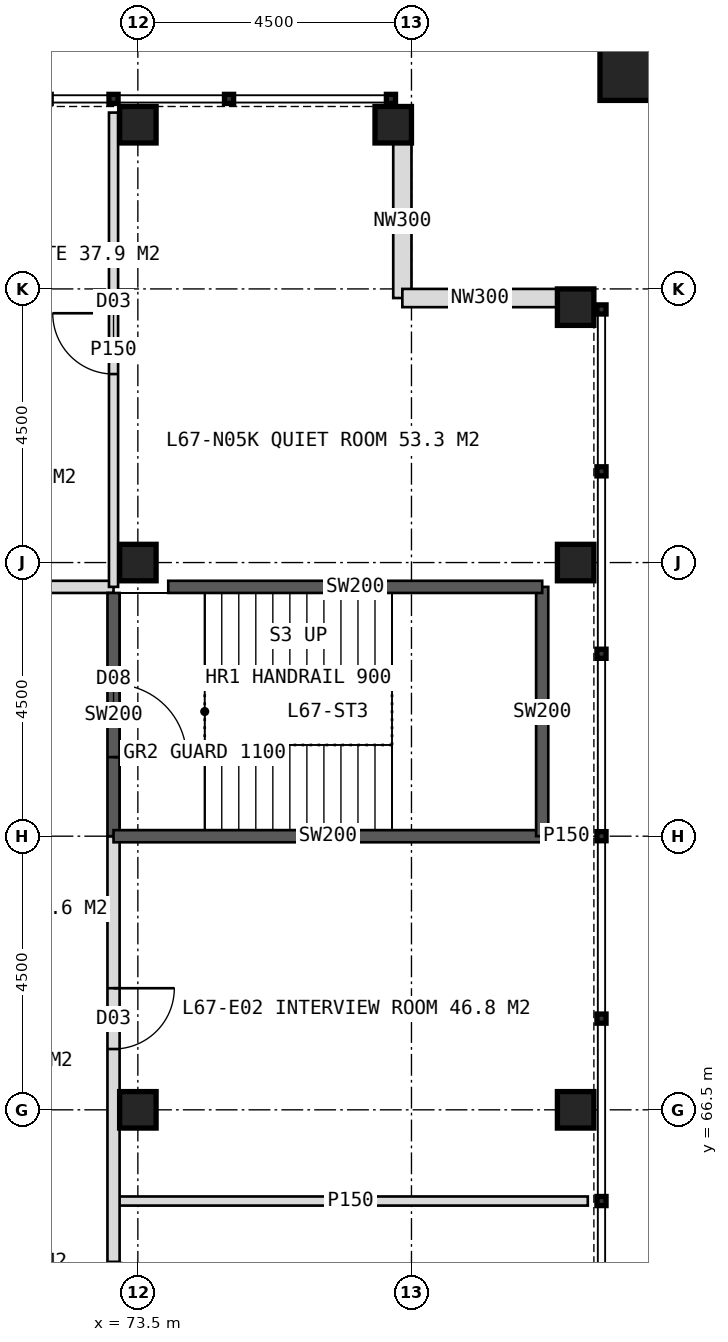
"""IFC4 building model, lengths in metres.
Left out: names, types, materials, properties, quantities, classifications, styles, units other than length and angle.
Written with IfcOpenShell. Run it as: python <this file> out.ifc"""

import sys

from ifc_helpers import new_model, si_unit, direction, frame, frame_2d, origin, origin_2d, place, context, subcontext, project, spatial, rectangle, hollow_rectangle, extrude, element, fill, save


model = new_model("IFC4")
c1 = context("Model", 3, precision=1e-05, world=origin(), true_north=direction((0.0, 1.0)))
c2 = subcontext(c1, "Body", "Model", "MODEL_VIEW")
j1 = project(units=[si_unit("LENGTHUNIT", "METRE"), si_unit("PLANEANGLEUNIT", "RADIAN")], contexts=[c1])
p1 = place(None, origin())
s1 = spatial("IfcSite", under=j1, at=p1, CompositionType="ELEMENT")
p2 = place(p1, origin())
s2 = spatial("IfcBuilding", under=s1, at=p2, CompositionType="ELEMENT")
p3 = place(p2, frame((0.0, 0.0, 278.0)))
s3 = spatial("IfcBuildingStorey", under=s2, at=p3, CompositionType="ELEMENT", Elevation=278.0)
for number, where, z_axis, x_axis in (
    (1, (73.5, 75.5, 0.0), (0.0, 0.0, 1.0), (1.0, 0.0, 0.0)),
    (2, (73.5, 66.5, 0.0), (0.0, 0.0, 1.0), (1.0, 0.0, 0.0)),
    (3, (80.7, 66.5, 0.0), (0.0, 0.0, 1.0), (1.0, 0.0, 0.0)),
    (4, (73.5, 82.7, 0.0), (0.0, 0.0, 1.0), (1.0, 0.0, 0.0)),
    (5, (80.7, 75.5, 0.0), (0.0, 0.0, 1.0), (1.0, 0.0, 0.0)),
    (6, (77.7, 82.7, 0.0), (0.0, 0.0, 1.0), (1.0, 0.0, 0.0)),
    (7, (80.7, 79.7, 0.0), (0.0, 0.0, 1.0), (1.0, 0.0, 0.0)),
):
    element("IfcColumn", number, at=place(p3, frame(where, z_axis=z_axis, x_axis=x_axis)), inside=s3, PredefinedType="COLUMN", context=c2, shape_type="SweptSolid", body=[
        extrude(hollow_rectangle(XDim=0.6, YDim=0.6, WallThickness=0.04, at=origin_2d()), origin(), (0.0, 0.0, 1.0), 4.0),
    ])
p4 = place(p3, frame((81.6, 83.6, 0.0), z_axis=(0.0, 0.0, 1.0), x_axis=(1.0, 0.0, 0.0)))
e8 = element("IfcColumn", 8, at=p4, inside=s3, PredefinedType="COLUMN", context=c2, shape_type="SweptSolid", body=[
    extrude(hollow_rectangle(XDim=1.0, YDim=1.0, WallThickness=0.06, at=origin_2d()), origin(), (0.0, 0.0, 1.0), 4.0),
])
for number, where, z_axis, x_axis in (
    (9, (77.85, 82.4, 0.0), (0.0, 0.0, 1.0), (0.0, -1.0, 0.0)),
    (10, (77.85, 79.85, 0.0), (0.0, 0.0, 1.0), (1.0, 0.0, 0.0)),
):
    element("IfcWall", number, at=place(p3, frame(where, z_axis=z_axis, x_axis=x_axis)), inside=s3, PredefinedType="ELEMENTEDWALL", context=c2, shape_type="SweptSolid", body=[
        extrude(rectangle(XDim=2.55, YDim=0.3, at=frame_2d((1.275, 0.0))), origin(), (0.0, 0.0, 1.0), 2.95),
    ])
p5 = place(p3, frame((46.9, 75.1, 0.0), z_axis=(0.0, 0.0, 1.0), x_axis=(1.0, 0.0, 0.0)))
e11 = element("IfcWall", 11, at=p5, inside=s3, PredefinedType="PARTITIONING", context=c2, shape_type="SweptSolid", body=[
    extrude(rectangle(XDim=26.2, YDim=0.2, at=frame_2d((13.1, 0.0))), origin(), (0.0, 0.0, 1.0), 3.75),
])
p6 = place(p5, frame((1.75, 0.0, 0.0)))
e12 = element("IfcOpeningElement", 12, at=p6, cuts=e11, PredefinedType="OPENING", context=c2, shape_type="SweptSolid", body=[
    extrude(rectangle(XDim=1.2, YDim=2.2, at=frame_2d((0.6, 1.1))), frame((0.0, 0.11, 0.0), z_axis=(0.0, -1.0, 0.0), x_axis=(1.0, 0.0, 0.0)), (0.0, 0.0, 1.0), 0.22),
])
p7 = place(p5, frame((6.75, 0.0, 0.0)))
e13 = element("IfcOpeningElement", 13, at=p7, cuts=e11, PredefinedType="OPENING", context=c2, shape_type="SweptSolid", body=[
    extrude(rectangle(XDim=1.0, YDim=2.1, at=frame_2d((0.5, 1.05))), frame((0.0, 0.11, 0.0), z_axis=(0.0, -1.0, 0.0), x_axis=(1.0, 0.0, 0.0)), (0.0, 0.0, 1.0), 0.22),
])
p8 = place(p5, frame((12.75, 0.0, 0.0)))
e14 = element("IfcOpeningElement", 14, at=p8, cuts=e11, PredefinedType="OPENING", context=c2, shape_type="SweptSolid", body=[
    extrude(rectangle(XDim=1.2, YDim=2.2, at=frame_2d((0.6, 1.1))), frame((0.0, 0.11, 0.0), z_axis=(0.0, -1.0, 0.0), x_axis=(1.0, 0.0, 0.0)), (0.0, 0.0, 1.0), 0.22),
])
p9 = place(p5, frame((18.45, 0.0, 0.0)))
e15 = element("IfcOpeningElement", 15, at=p9, cuts=e11, PredefinedType="OPENING", context=c2, shape_type="SweptSolid", body=[
    extrude(rectangle(XDim=1.0, YDim=2.1, at=frame_2d((0.5, 1.05))), frame((0.0, 0.11, 0.0), z_axis=(0.0, -1.0, 0.0), x_axis=(1.0, 0.0, 0.0)), (0.0, 0.0, 1.0), 0.22),
])
p10 = place(p5, frame((23.25, 0.0, 0.0)))
e16 = element("IfcOpeningElement", 16, at=p10, cuts=e11, PredefinedType="OPENING", context=c2, shape_type="SweptSolid", body=[
    extrude(rectangle(XDim=1.2, YDim=2.2, at=frame_2d((0.6, 1.1))), frame((0.0, 0.11, 0.0), z_axis=(0.0, -1.0, 0.0), x_axis=(1.0, 0.0, 0.0)), (0.0, 0.0, 1.0), 0.22),
])
p11 = place(p3, frame((73.1, 75.1, 0.0), z_axis=(0.0, 0.0, 1.0), x_axis=(0.0, 1.0, 0.0)))
e17 = element("IfcWall", 17, at=p11, inside=s3, PredefinedType="PARTITIONING", context=c2, shape_type="SweptSolid", body=[
    extrude(rectangle(XDim=7.8, YDim=0.15, at=frame_2d((3.9, 0.0))), origin(), (0.0, 0.0, 1.0), 3.75),
])
p12 = place(p11, frame((3.5, 0.0, 0.0)))
e18 = element("IfcOpeningElement", 18, at=p12, cuts=e17, PredefinedType="OPENING", context=c2, shape_type="SweptSolid", body=[
    extrude(rectangle(XDim=1.0, YDim=2.1, at=frame_2d((0.5, 1.05))), frame((0.0, 0.085, 0.0), z_axis=(0.0, -1.0, 0.0), x_axis=(1.0, 0.0, 0.0)), (0.0, 0.0, 1.0), 0.17),
])
p13 = place(p3, frame((80.2, 71.0, 0.0), z_axis=(0.0, 0.0, 1.0), x_axis=(1.0, 0.0, 0.0)))
e19 = element("IfcWall", 19, at=p13, inside=s3, PredefinedType="PARTITIONING", context=c2, shape_type="SweptSolid", body=[
    extrude(rectangle(XDim=0.7, YDim=0.15, at=frame_2d((0.35, 0.0))), origin(), (0.0, 0.0, 1.0), 3.75),
])
p14 = place(p3, frame((73.1, 65.0, 0.0), z_axis=(0.0, 0.0, 1.0), x_axis=(1.0, 0.0, 0.0)))
e20 = element("IfcWall", 20, at=p14, inside=s3, PredefinedType="PARTITIONING", context=c2, shape_type="SweptSolid", body=[
    extrude(rectangle(XDim=7.8, YDim=0.15, at=frame_2d((3.9, 0.0))), origin(), (0.0, 0.0, 1.0), 3.75),
])
p15 = place(p3, frame((73.1, 71.0, 0.0), z_axis=(0.0, 0.0, 1.0), x_axis=(0.0, -1.0, 0.0)))
e21 = element("IfcWall", 21, at=p15, inside=s3, PredefinedType="PARTITIONING", context=c2, shape_type="SweptSolid", body=[
    extrude(rectangle(XDim=22.1, YDim=0.2, at=frame_2d((11.05, 0.0))), origin(), (0.0, 0.0, 1.0), 3.75),
])
p16 = place(p15, frame((2.5, 0.0, 0.0)))
e22 = element("IfcOpeningElement", 22, at=p16, cuts=e21, PredefinedType="OPENING", context=c2, shape_type="SweptSolid", body=[
    extrude(rectangle(XDim=1.0, YDim=2.1, at=frame_2d((0.5, 1.05))), frame((0.0, 0.11, 0.0), z_axis=(0.0, -1.0, 0.0), x_axis=(1.0, 0.0, 0.0)), (0.0, 0.0, 1.0), 0.22),
])
p17 = place(p15, frame((7.0, 0.0, 0.0)))
e23 = element("IfcOpeningElement", 23, at=p17, cuts=e21, PredefinedType="OPENING", context=c2, shape_type="SweptSolid", body=[
    extrude(rectangle(XDim=1.0, YDim=2.1, at=frame_2d((0.5, 1.05))), frame((0.0, 0.11, 0.0), z_axis=(0.0, -1.0, 0.0), x_axis=(1.0, 0.0, 0.0)), (0.0, 0.0, 1.0), 0.22),
])
p18 = place(p15, frame((9.75, 0.0, 0.0)))
e24 = element("IfcOpeningElement", 24, at=p18, cuts=e21, PredefinedType="OPENING", context=c2, shape_type="SweptSolid", body=[
    extrude(rectangle(XDim=0.9, YDim=2.1, at=frame_2d((0.45, 1.05))), frame((0.0, 0.11, 0.0), z_axis=(0.0, -1.0, 0.0), x_axis=(1.0, 0.0, 0.0)), (0.0, 0.0, 1.0), 0.22),
])
p19 = place(p15, frame((11.65, 0.0, 0.0)))
e25 = element("IfcOpeningElement", 25, at=p19, cuts=e21, PredefinedType="OPENING", context=c2, shape_type="SweptSolid", body=[
    extrude(rectangle(XDim=1.0, YDim=2.1, at=frame_2d((0.5, 1.05))), frame((0.0, 0.11, 0.0), z_axis=(0.0, -1.0, 0.0), x_axis=(1.0, 0.0, 0.0)), (0.0, 0.0, 1.0), 0.22),
])
p20 = place(p15, frame((19.15, 0.0, 0.0)))
e26 = element("IfcOpeningElement", 26, at=p20, cuts=e21, PredefinedType="OPENING", context=c2, shape_type="SweptSolid", body=[
    extrude(rectangle(XDim=1.2, YDim=2.2, at=frame_2d((0.6, 1.1))), frame((0.0, 0.11, 0.0), z_axis=(0.0, -1.0, 0.0), x_axis=(1.0, 0.0, 0.0)), (0.0, 0.0, 1.0), 0.22),
])
p21 = place(p3, frame((73.1, 75.0, 0.0), z_axis=(0.0, 0.0, 1.0), x_axis=(0.0, -1.0, 0.0)))
e27 = element("IfcWall", 27, at=p21, inside=s3, PredefinedType="SOLIDWALL", context=c2, shape_type="SweptSolid", body=[
    extrude(rectangle(XDim=4.0, YDim=0.2, at=frame_2d((2.0, 0.0))), origin(), (0.0, 0.0, 1.0), 3.75),
])
p22 = place(p21, frame((1.5, 0.0, 0.0)))
e28 = element("IfcOpeningElement", 28, at=p22, cuts=e27, PredefinedType="OPENING", context=c2, shape_type="SweptSolid", body=[
    extrude(rectangle(XDim=1.2, YDim=2.1, at=frame_2d((0.6, 1.05))), frame((0.0, 0.11, 0.0), z_axis=(0.0, -1.0, 0.0), x_axis=(1.0, 0.0, 0.0)), (0.0, 0.0, 1.0), 0.22),
])
p23 = place(p3, frame((73.1, 71.0, 0.0), z_axis=(0.0, 0.0, 1.0), x_axis=(1.0, 0.0, 0.0)))
e29 = element("IfcWall", 29, at=p23, inside=s3, PredefinedType="SOLIDWALL", context=c2, shape_type="SweptSolid", body=[
    extrude(rectangle(XDim=7.05, YDim=0.2, at=frame_2d((3.525, 0.0))), origin(), (0.0, 0.0, 1.0), 3.75),
])
p24 = place(p3, frame((80.15, 71.0, 0.0), z_axis=(0.0, 0.0, 1.0), x_axis=(0.0, 1.0, 0.0)))
e30 = element("IfcWall", 30, at=p24, inside=s3, PredefinedType="SOLIDWALL", context=c2, shape_type="SweptSolid", body=[
    extrude(rectangle(XDim=4.1, YDim=0.2, at=frame_2d((2.05, 0.0))), origin(), (0.0, 0.0, 1.0), 3.75),
])
p25 = place(p3, frame((74.0, 75.1, 0.0), z_axis=(0.0, 0.0, 1.0), x_axis=(1.0, 0.0, 0.0)))
e31 = element("IfcWall", 31, at=p25, inside=s3, PredefinedType="SOLIDWALL", context=c2, shape_type="SweptSolid", body=[
    extrude(rectangle(XDim=6.15, YDim=0.2, at=frame_2d((3.075, 0.0))), origin(), (0.0, 0.0, 1.0), 3.75),
])
p26 = place(p12, origin())
e32 = element("IfcDoor", 32, at=p26, inside=s3, OperationType="SINGLE_SWING_RIGHT", PredefinedType="DOOR", context=c2, shape_type="SweptSolid", body=[
    extrude(rectangle(XDim=1.0, YDim=2.1, at=frame_2d((0.5, 1.05))), frame((0.0, 0.025, 0.0), z_axis=(0.0, -1.0, 0.0), x_axis=(1.0, 0.0, 0.0)), (0.0, 0.0, 1.0), 0.05),
])
fill(e18, e32)
p27 = place(p16, origin())
e33 = element("IfcDoor", 33, at=p27, inside=s3, OperationType="SINGLE_SWING_LEFT", PredefinedType="DOOR", context=c2, shape_type="SweptSolid", body=[
    extrude(rectangle(XDim=1.0, YDim=2.1, at=frame_2d((0.5, 1.05))), frame((0.0, 0.025, 0.0), z_axis=(0.0, -1.0, 0.0), x_axis=(1.0, 0.0, 0.0)), (0.0, 0.0, 1.0), 0.05),
])
fill(e22, e33)
p28 = place(p22, origin())
e34 = element("IfcDoor", 34, at=p28, inside=s3, OperationType="SINGLE_SWING_RIGHT", PredefinedType="DOOR", context=c2, shape_type="SweptSolid", body=[
    extrude(rectangle(XDim=1.2, YDim=2.1, at=frame_2d((0.6, 1.05))), frame((0.0, 0.025, 0.0), z_axis=(0.0, -1.0, 0.0), x_axis=(1.0, 0.0, 0.0)), (0.0, 0.0, 1.0), 0.05),
])
fill(e28, e34)
save(model, sys.argv[1])
